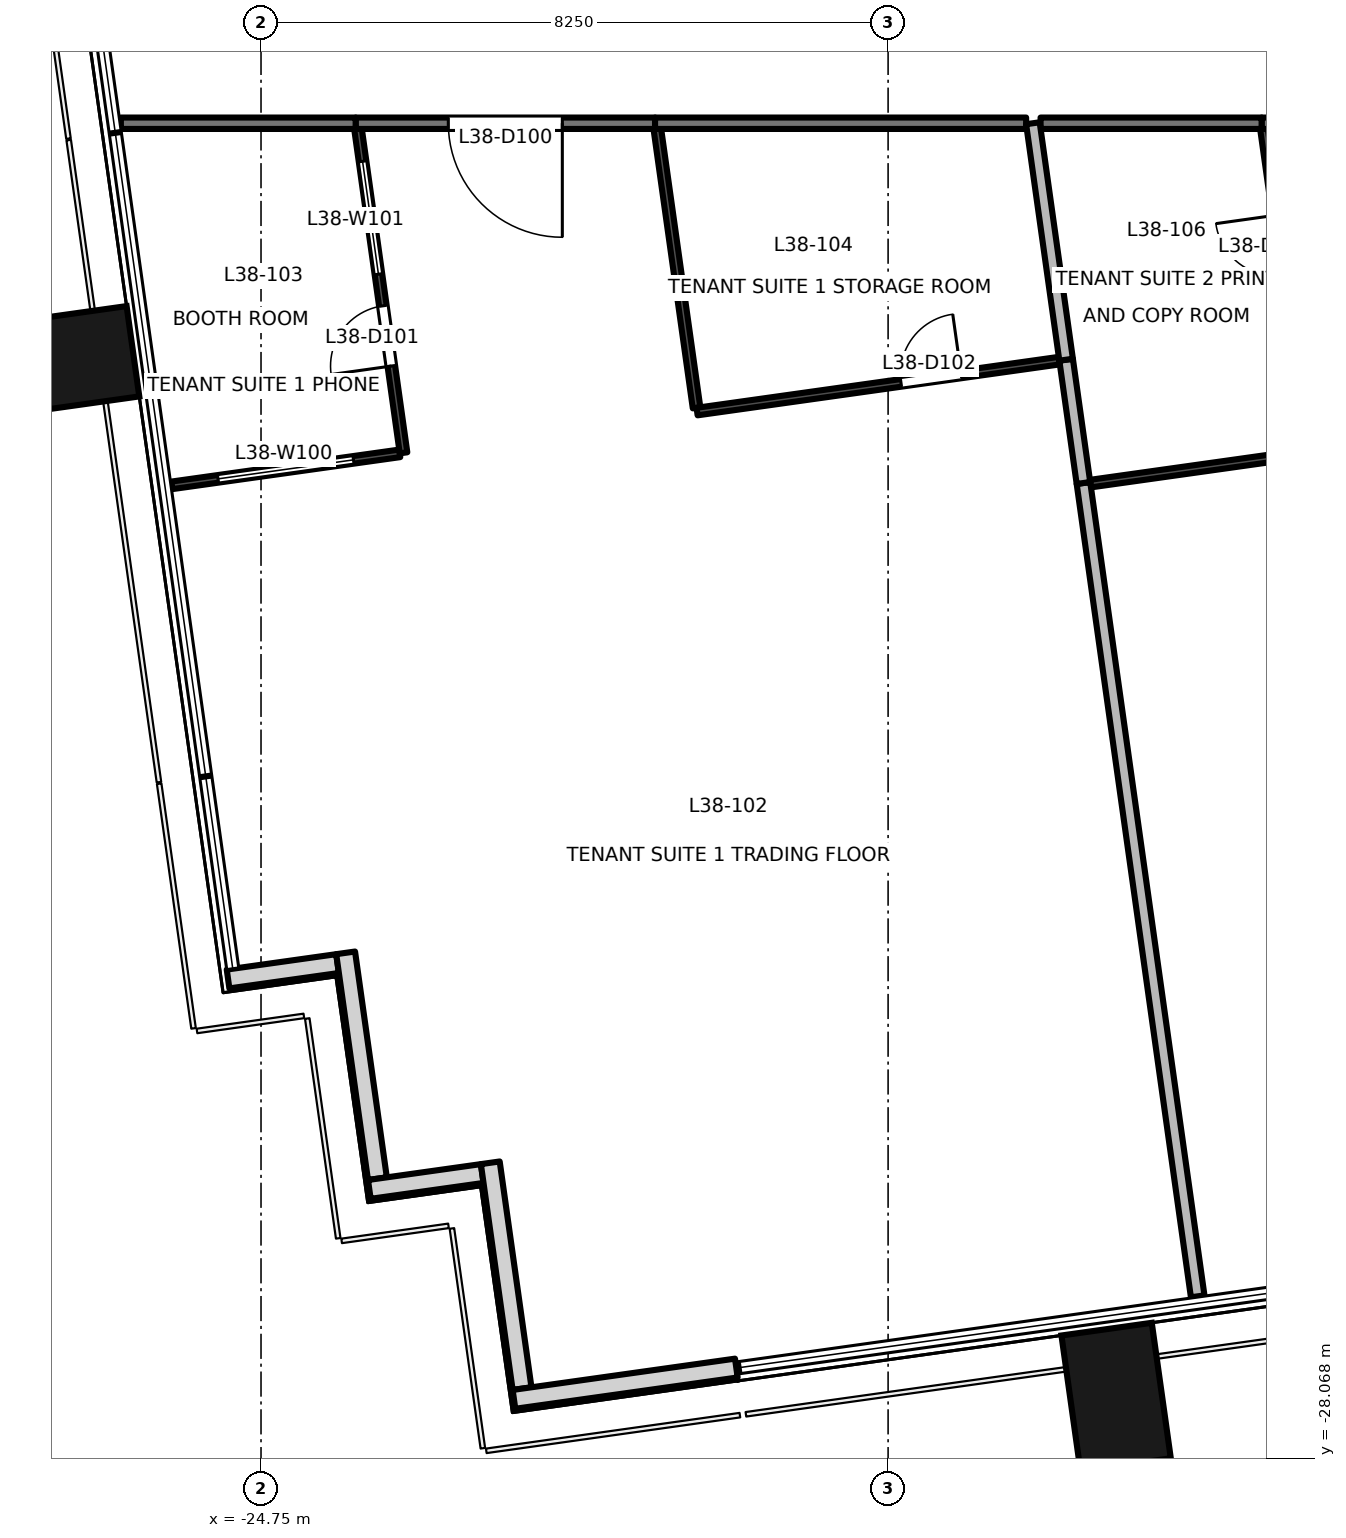
"""IFC4 building model, lengths in metres.
Left out: names, types, materials, properties, quantities, classifications, styles, units other than length and angle.
Written with IfcOpenShell. Run it as: python <this file> out.ifc"""

import sys

from ifc_helpers import new_model, si_unit, direction, frame, frame_2d, origin, origin_2d, place, context, subcontext, project, spatial, rectangle, extrude, element, fill, save


model = new_model("IFC4")
c1 = context("Model", 3, precision=1e-05, world=origin(), true_north=direction((0.0, 1.0)))
c2 = subcontext(c1, "Body", "Model", "MODEL_VIEW")
j1 = project(units=[si_unit("LENGTHUNIT", "METRE"), si_unit("PLANEANGLEUNIT", "RADIAN")], contexts=[c1])
p1 = place(None, origin())
s1 = spatial("IfcSite", under=j1, at=p1, CompositionType="ELEMENT")
p2 = place(p1, origin())
s2 = spatial("IfcBuilding", under=s1, at=p2, CompositionType="ELEMENT")
p3 = place(p2, frame((0.0, 0.0, 168.5)))
s3 = spatial("IfcBuildingStorey", under=s2, at=p3, CompositionType="ELEMENT", Elevation=168.5)
for number, where, z_axis, x_axis in (
    (1, (-13.5, -27.256, -0.2), (0.0, 0.0, 1.0), (0.99, 0.139, 0.0)),
    (2, (-27.326, -13.625, -0.2), (0.0, 0.0, 1.0), (-0.139, 0.99, 0.0)),
):
    element("IfcColumn", number, at=place(p3, frame(where, z_axis=z_axis, x_axis=x_axis)), inside=s3, PredefinedType="COLUMN", context=c2, shape_type="SweptSolid", body=[
        extrude(rectangle(XDim=1.2, YDim=1.8, at=origin_2d()), origin(), (0.0, 0.0, 1.0), 3.9),
    ])
p4 = place(p3, frame((-25.184, -21.758, 0.0), z_axis=(0.0, 0.0, 1.0), x_axis=(0.9902493448, 0.13930626376, 0.0)))
e3 = element("IfcWall", 3, at=p4, inside=s3, PredefinedType="SOLIDWALL", context=c2, shape_type="SweptSolid", body=[
    extrude(rectangle(XDim=1.455, YDim=0.25, at=frame_2d((0.727, 0.0))), origin(), (0.0, 0.0, 1.0), 3.7),
])
p5 = place(p3, frame((-23.637, -21.414, 0.0), z_axis=(0.0, 0.0, 1.0), x_axis=(0.139313431826, -0.990248336385, 0.0)))
e4 = element("IfcWall", 4, at=p5, inside=s3, PredefinedType="SOLIDWALL", context=c2, shape_type="SweptSolid", body=[
    extrude(rectangle(XDim=3.0, YDim=0.25, at=frame_2d((1.5, 0.0))), origin(), (0.0, 0.0, 1.0), 3.7),
])
p6 = place(p3, frame((-23.325, -24.526, 0.0), z_axis=(0.0, 0.0, 1.0), x_axis=(0.990243596651, 0.13934711799, 0.0)))
e5 = element("IfcWall", 5, at=p6, inside=s3, PredefinedType="SOLIDWALL", context=c2, shape_type="SweptSolid", body=[
    extrude(rectangle(XDim=1.5, YDim=0.25, at=frame_2d((0.75, 0.0))), origin(), (0.0, 0.0, 1.0), 3.7),
])
p7 = place(p3, frame((-21.734, -24.176, 0.0), z_axis=(0.0, 0.0, 1.0), x_axis=(0.139313431826, -0.990248336385, 0.0)))
e6 = element("IfcWall", 6, at=p7, inside=s3, PredefinedType="SOLIDWALL", context=c2, shape_type="SweptSolid", body=[
    extrude(rectangle(XDim=3.0, YDim=0.25, at=frame_2d((1.5, 0.0))), origin(), (0.0, 0.0, 1.0), 3.7),
])
p8 = place(p3, frame((-21.422, -27.288, 0.0), z_axis=(0.0, 0.0, 1.0), x_axis=(0.990246427036, 0.139327002919, 0.0)))
e7 = element("IfcWall", 7, at=p8, inside=s3, PredefinedType="SOLIDWALL", context=c2, shape_type="SweptSolid", body=[
    extrude(rectangle(XDim=2.954, YDim=0.25, at=frame_2d((1.477, 0.0))), origin(), (0.0, 0.0, 1.0), 3.7),
])
p9 = place(p3, frame((-19.566, -10.5, 0.0), z_axis=(0.0, 0.0, 1.0), x_axis=(-1.0, 0.0, 0.0)))
e8 = element("IfcWall", 8, at=p9, inside=s3, PredefinedType="PARTITIONING", context=c2, shape_type="SweptSolid", body=[
    extrude(rectangle(XDim=3.939, YDim=0.15, at=frame_2d((1.969, 0.0))), origin(), (0.0, 0.0, 1.0), 3.7),
])
p10 = place(p9, frame((1.22, 0.0, 0.0)))
e9 = element("IfcOpeningElement", 9, at=p10, cuts=e8, PredefinedType="OPENING", context=c2, shape_type="SweptSolid", body=[
    extrude(rectangle(XDim=1.5, YDim=2.1, at=frame_2d((0.75, 1.05))), frame((0.0, 0.085, 0.0), z_axis=(0.0, -1.0, 0.0), x_axis=(1.0, 0.0, 0.0)), (0.0, 0.0, 1.0), 0.171),
])
p11 = place(p3, frame((-23.505, -10.5, 0.0), z_axis=(0.0, 0.0, 1.0), x_axis=(-1.0, 0.0, 0.0)))
e10 = element("IfcWall", 10, at=p11, inside=s3, PredefinedType="PARTITIONING", context=c2, shape_type="SweptSolid", body=[
    extrude(rectangle(XDim=3.089, YDim=0.15, at=frame_2d((1.544, 0.0))), origin(), (0.0, 0.0, 1.0), 3.7),
])
p12 = place(p3, frame((-14.684, -10.5, 0.0), z_axis=(0.0, 0.0, 1.0), x_axis=(-1.0, 0.0, 0.0)))
e11 = element("IfcWall", 11, at=p12, inside=s3, PredefinedType="PARTITIONING", context=c2, shape_type="SweptSolid", body=[
    extrude(rectangle(XDim=4.882, YDim=0.15, at=frame_2d((2.441, 0.0))), origin(), (0.0, 0.0, 1.0), 3.7),
])
p13 = place(p3, frame((-7.648, -10.5, 0.0), z_axis=(0.0, 0.0, 1.0), x_axis=(-1.0, 0.0, 0.0)))
e12 = element("IfcWall", 12, at=p13, inside=s3, PredefinedType="PARTITIONING", context=c2, shape_type="SweptSolid", body=[
    extrude(rectangle(XDim=3.938, YDim=0.15, at=frame_2d((1.969, 0.0))), origin(), (0.0, 0.0, 1.0), 2.8),
])
p14 = place(p3, frame((-11.586, -10.5, 0.0), z_axis=(0.0, 0.0, 1.0), x_axis=(-1.0, 0.0, 0.0)))
e13 = element("IfcWall", 13, at=p14, inside=s3, PredefinedType="PARTITIONING", context=c2, shape_type="SweptSolid", body=[
    extrude(rectangle(XDim=2.908, YDim=0.15, at=frame_2d((1.454, 0.0))), origin(), (0.0, 0.0, 1.0), 2.8),
])
p15 = place(p3, frame((-25.925, -15.264, 0.0), z_axis=(0.0, 0.0, 1.0), x_axis=(0.990300981683, 0.138938711948, 0.0)))
e14 = element("IfcWall", 14, at=p15, inside=s3, PredefinedType="PARTITIONING", context=c2, shape_type="SweptSolid", body=[
    extrude(rectangle(XDim=3.029, YDim=0.1, at=frame_2d((1.515, 0.0))), origin(), (0.0, 0.0, 1.0), 3.7),
])
p16 = place(p15, frame((0.615, 0.0, 0.9)))
e15 = element("IfcOpeningElement", 15, at=p16, cuts=e14, PredefinedType="OPENING", context=c2, shape_type="SweptSolid", body=[
    extrude(rectangle(XDim=1.8, YDim=1.2, at=frame_2d((0.9, 0.6))), frame((0.0, 0.061, 0.0), z_axis=(0.0, -1.0, 0.0), x_axis=(1.0, 0.0, 0.0)), (0.0, 0.0, 1.0), 0.121),
])
p17 = place(p3, frame((-22.875, -14.836, 0.0), z_axis=(0.0, 0.0, 1.0), x_axis=(-0.139240076126, 0.990258653686, 0.0)))
e16 = element("IfcWall", 16, at=p17, inside=s3, PredefinedType="PARTITIONING", context=c2, shape_type="SweptSolid", body=[
    extrude(rectangle(XDim=4.31, YDim=0.1, at=frame_2d((2.155, 0.0))), origin(), (0.0, 0.0, 1.0), 3.7),
])
p18 = place(p17, frame((1.153, 0.0, 0.0)))
e17 = element("IfcOpeningElement", 17, at=p18, cuts=e16, PredefinedType="OPENING", context=c2, shape_type="SweptSolid", body=[
    extrude(rectangle(XDim=0.8, YDim=2.1, at=frame_2d((0.4, 1.05))), frame((0.0, 0.061, 0.0), z_axis=(0.0, -1.0, 0.0), x_axis=(1.0, 0.0, 0.0)), (0.0, 0.0, 1.0), 0.121),
])
p19 = place(p17, frame((2.373, 0.0, 0.9)))
e18 = element("IfcOpeningElement", 18, at=p19, cuts=e16, PredefinedType="OPENING", context=c2, shape_type="SweptSolid", body=[
    extrude(rectangle(XDim=1.5, YDim=1.2, at=frame_2d((0.75, 0.6))), frame((0.0, 0.061, 0.0), z_axis=(0.0, -1.0, 0.0), x_axis=(1.0, 0.0, 0.0)), (0.0, 0.0, 1.0), 0.121),
])
p20 = place(p3, frame((-19.537, -10.568, 0.0), z_axis=(0.0, 0.0, 1.0), x_axis=(0.139303202992, -0.990249775378, 0.0)))
e19 = element("IfcWall", 19, at=p20, inside=s3, PredefinedType="PARTITIONING", context=c2, shape_type="SweptSolid", body=[
    extrude(rectangle(XDim=3.712, YDim=0.1, at=frame_2d((1.856, 0.0))), origin(), (0.0, 0.0, 1.0), 3.7),
])
p21 = place(p3, frame((-19.013, -14.293, 0.0), z_axis=(0.0, 0.0, 1.0), x_axis=(0.990264556242, 0.139198091406, 0.0)))
e20 = element("IfcWall", 20, at=p21, inside=s3, PredefinedType="PARTITIONING", context=c2, shape_type="SweptSolid", body=[
    extrude(rectangle(XDim=4.813, YDim=0.1, at=frame_2d((2.406, 0.0))), origin(), (0.0, 0.0, 1.0), 3.7),
])
p22 = place(p21, frame((2.709, 0.0, 0.0)))
e21 = element("IfcOpeningElement", 21, at=p22, cuts=e20, PredefinedType="OPENING", context=c2, shape_type="SweptSolid", body=[
    extrude(rectangle(XDim=0.8, YDim=2.1, at=frame_2d((0.4, 1.05))), frame((0.0, 0.061, 0.0), z_axis=(0.0, -1.0, 0.0), x_axis=(1.0, 0.0, 0.0)), (0.0, 0.0, 1.0), 0.121),
])
p23 = place(p3, frame((-13.93, -15.233, 0.0), z_axis=(0.0, 0.0, 1.0), x_axis=(0.139092809985, -0.990279349583, 0.0)))
e22 = element("IfcWall", 22, at=p23, inside=s3, PredefinedType="PARTITIONING", context=c2, shape_type="SweptSolid", body=[
    extrude(rectangle(XDim=10.805, YDim=0.18, at=frame_2d((5.403, 0.0))), origin(), (0.0, 0.0, 1.0), 2.8),
])
p24 = place(p3, frame((-14.158, -13.611, 0.0), z_axis=(0.0, 0.0, 1.0), x_axis=(0.139229707098, -0.990260111618, 0.0)))
e23 = element("IfcWall", 23, at=p24, inside=s3, PredefinedType="PARTITIONING", context=c2, shape_type="SweptSolid", body=[
    extrude(rectangle(XDim=1.638, YDim=0.18, at=frame_2d((0.819, 0.0))), origin(), (0.0, 0.0, 1.0), 3.7),
])
p25 = place(p3, frame((-14.595, -10.5, 0.0), z_axis=(0.0, 0.0, 1.0), x_axis=(0.139103611391, -0.990277832377, 0.0)))
e24 = element("IfcWall", 24, at=p25, inside=s3, PredefinedType="PARTITIONING", context=c2, shape_type="SweptSolid", body=[
    extrude(rectangle(XDim=3.142, YDim=0.18, at=frame_2d((1.571, 0.0))), origin(), (0.0, 0.0, 1.0), 3.7),
])
p26 = place(p3, frame((-13.838, -15.241, 0.0), z_axis=(0.0, 0.0, 1.0), x_axis=(0.990263018372, 0.139209031475, 0.0)))
e25 = element("IfcWall", 25, at=p26, inside=s3, PredefinedType="PARTITIONING", context=c2, shape_type="SweptSolid", body=[
    extrude(rectangle(XDim=2.859, YDim=0.1, at=frame_2d((1.429, 0.0))), origin(), (0.0, 0.0, 1.0), 2.8),
])
p27 = place(p3, frame((-10.957, -14.836, 0.0), z_axis=(0.0, 0.0, 1.0), x_axis=(-0.138962312518, 0.990297670249, 0.0)))
e26 = element("IfcWall", 26, at=p27, inside=s3, PredefinedType="PARTITIONING", context=c2, shape_type="SweptSolid", body=[
    extrude(rectangle(XDim=4.31, YDim=0.1, at=frame_2d((2.155, 0.0))), origin(), (0.0, 0.0, 1.0), 3.7),
])
p28 = place(p27, frame((2.357, 0.0, 0.0)))
e27 = element("IfcOpeningElement", 27, at=p28, cuts=e26, PredefinedType="OPENING", context=c2, shape_type="SweptSolid", body=[
    extrude(rectangle(XDim=0.8, YDim=2.1, at=frame_2d((0.4, 1.05))), frame((0.0, 0.061, 0.0), z_axis=(0.0, -1.0, 0.0), x_axis=(1.0, 0.0, 0.0)), (0.0, 0.0, 1.0), 0.121),
])
p29 = place(p10, origin())
e28 = element("IfcDoor", 28, at=p29, inside=s3, OperationType="DOUBLE_DOOR_SINGLE_SWING", PredefinedType="DOOR", context=c2, shape_type="SweptSolid", body=[
    extrude(rectangle(XDim=1.5, YDim=2.1, at=frame_2d((0.75, 1.05))), frame((0.0, 0.025, 0.0), z_axis=(0.0, -1.0, 0.0), x_axis=(1.0, 0.0, 0.0)), (0.0, 0.0, 1.0), 0.05),
])
fill(e9, e28)
p30 = place(p18, origin())
e29 = element("IfcDoor", 29, at=p30, inside=s3, OperationType="SINGLE_SWING_LEFT", PredefinedType="DOOR", context=c2, shape_type="SweptSolid", body=[
    extrude(rectangle(XDim=0.8, YDim=2.1, at=frame_2d((0.4, 1.05))), frame((0.0, 0.025, 0.0), z_axis=(0.0, -1.0, 0.0), x_axis=(1.0, 0.0, 0.0)), (0.0, 0.0, 1.0), 0.05),
])
fill(e17, e29)
p31 = place(p22, origin())
e30 = element("IfcDoor", 30, at=p31, inside=s3, OperationType="SINGLE_SWING_RIGHT", PredefinedType="DOOR", context=c2, shape_type="SweptSolid", body=[
    extrude(rectangle(XDim=0.8, YDim=2.1, at=frame_2d((0.4, 1.05))), frame((0.0, 0.025, 0.0), z_axis=(0.0, -1.0, 0.0), x_axis=(1.0, 0.0, 0.0)), (0.0, 0.0, 1.0), 0.05),
])
fill(e21, e30)
p32 = place(p16, origin())
e31 = element("IfcWindow", 31, at=p32, inside=s3, PartitioningType="SINGLE_PANEL", PredefinedType="WINDOW", context=c2, shape_type="SweptSolid", body=[
    extrude(rectangle(XDim=1.8, YDim=1.2, at=frame_2d((0.9, 0.6))), frame((0.0, 0.03, 0.0), z_axis=(0.0, -1.0, 0.0), x_axis=(1.0, 0.0, 0.0)), (0.0, 0.0, 1.0), 0.06),
])
fill(e15, e31)
p33 = place(p19, origin())
e32 = element("IfcWindow", 32, at=p33, inside=s3, PartitioningType="SINGLE_PANEL", PredefinedType="WINDOW", context=c2, shape_type="SweptSolid", body=[
    extrude(rectangle(XDim=1.5, YDim=1.2, at=frame_2d((0.75, 0.6))), frame((0.0, 0.03, 0.0), z_axis=(0.0, -1.0, 0.0), x_axis=(1.0, 0.0, 0.0)), (0.0, 0.0, 1.0), 0.06),
])
fill(e18, e32)
save(model, sys.argv[1])
